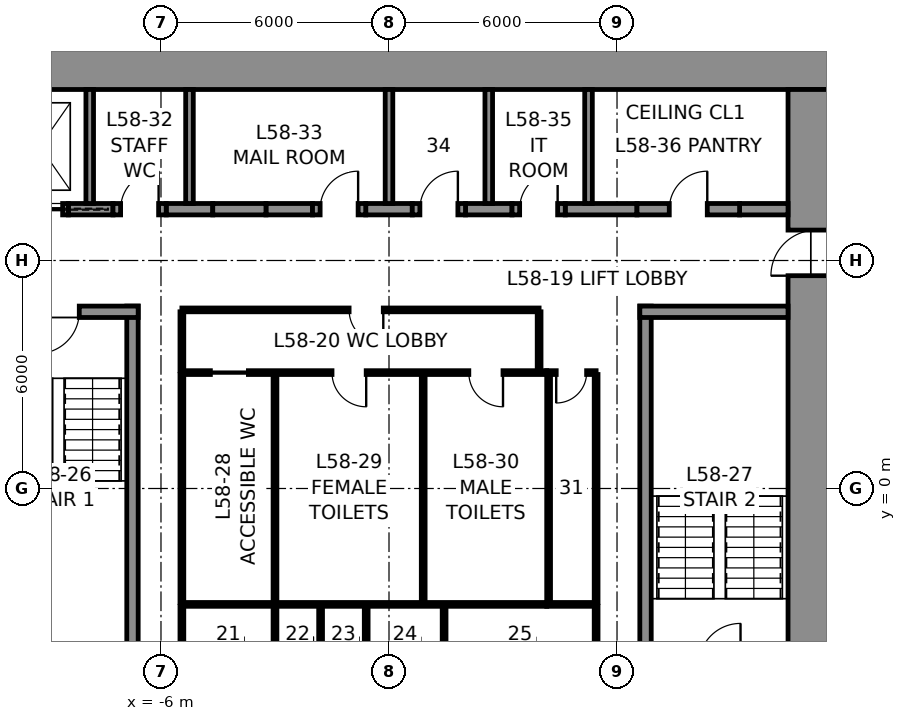
"""IFC4 building model, lengths in metres.
Left out: names, types, materials, properties, quantities, classifications, styles, units other than length and angle.
Written with IfcOpenShell. Run it as: python <this file> out.ifc"""

import sys

from ifc_helpers import new_model, si_unit, direction, frame, frame_2d, origin, place, context, subcontext, project, spatial, rectangle, extrude, element, fill, save


model = new_model("IFC4")
c1 = context("Model", 3, precision=1e-05, world=origin(), true_north=direction((0.0, 1.0)))
c2 = subcontext(c1, "Body", "Model", "MODEL_VIEW")
j1 = project(units=[si_unit("LENGTHUNIT", "METRE"), si_unit("PLANEANGLEUNIT", "RADIAN")], contexts=[c1])
p1 = place(None, origin())
s1 = spatial("IfcSite", under=j1, at=p1, CompositionType="ELEMENT")
p2 = place(p1, origin())
s2 = spatial("IfcBuilding", under=s1, at=p2, CompositionType="ELEMENT")
p3 = place(p2, frame((0.0, 0.0, 261.8)))
s3 = spatial("IfcBuildingStorey", under=s2, at=p3, CompositionType="ELEMENT", Elevation=261.8)
p4 = place(p3, frame((-12.0, 11.25, 0.0), z_axis=(0.0, 0.0, 1.0), x_axis=(1.0, 0.0, 0.0)))
e1 = element("IfcWall", 1, at=p4, inside=s3, PredefinedType="SHEAR", context=c2, shape_type="SweptSolid", body=[
    extrude(rectangle(XDim=24.0, YDim=1.5, at=frame_2d((12.0, 0.0))), origin(), (0.0, 0.0, 1.0), 4.0),
])
p5 = place(p3, frame((11.25, 10.5, 0.0), z_axis=(0.0, 0.0, 1.0), x_axis=(0.0, -1.0, 0.0)))
e2 = element("IfcWall", 2, at=p5, inside=s3, PredefinedType="SHEAR", context=c2, shape_type="SweptSolid", body=[
    extrude(rectangle(XDim=21.0, YDim=1.5, at=frame_2d((10.5, 0.0))), origin(), (0.0, 0.0, 1.0), 4.0),
])
p6 = place(p5, frame((3.7, 0.0, 0.0)))
e3 = element("IfcOpeningElement", 3, at=p6, cuts=e2, PredefinedType="OPENING", context=c2, shape_type="SweptSolid", body=[
    extrude(rectangle(XDim=1.2, YDim=2.3, at=frame_2d((0.6, 1.15))), frame((0.0, 0.76, 0.0), z_axis=(0.0, -1.0, 0.0), x_axis=(1.0, 0.0, 0.0)), (0.0, 0.0, 1.0), 1.52),
])
p7 = place(p5, frame((16.1, 0.0, 0.0)))
e4 = element("IfcOpeningElement", 4, at=p7, cuts=e2, PredefinedType="OPENING", context=c2, shape_type="SweptSolid", body=[
    extrude(rectangle(XDim=1.2, YDim=2.3, at=frame_2d((0.6, 1.15))), frame((0.0, 0.76, 0.0), z_axis=(0.0, -1.0, 0.0), x_axis=(1.0, 0.0, 0.0)), (0.0, 0.0, 1.0), 1.52),
])
p8 = place(p3, frame((-8.438, 7.35, 0.0), z_axis=(0.0, 0.0, 1.0), x_axis=(1.0, 0.0, 0.0)))
e5 = element("IfcWall", 5, at=p8, inside=s3, PredefinedType="SHEAR", context=c2, shape_type="SweptSolid", body=[
    extrude(rectangle(XDim=1.175, YDim=0.3, at=frame_2d((0.587, 0.0))), origin(), (0.0, 0.0, 1.0), 4.0),
])
for number, where, z_axis, x_axis in (
    (6, (-5.863, 7.35, 0.0), (0.0, 0.0, 1.0), (1.0, 0.0, 0.0)),
    (7, (-3.238, 7.35, 0.0), (0.0, 0.0, 1.0), (1.0, 0.0, 0.0)),
    (8, (-0.613, 7.35, 0.0), (0.0, 0.0, 1.0), (1.0, 0.0, 0.0)),
    (9, (2.012, 7.35, 0.0), (0.0, 0.0, 1.0), (1.0, 0.0, 0.0)),
):
    element("IfcWall", number, at=place(p3, frame(where, z_axis=z_axis, x_axis=x_axis)), inside=s3, PredefinedType="SHEAR", context=c2, shape_type="SweptSolid", body=[
        extrude(rectangle(XDim=1.225, YDim=0.3, at=frame_2d((0.613, 0.0))), origin(), (0.0, 0.0, 1.0), 4.0),
    ])
p9 = place(p3, frame((4.637, 7.35, 0.0), z_axis=(0.0, 0.0, 1.0), x_axis=(1.0, 0.0, 0.0)))
e10 = element("IfcWall", 10, at=p9, inside=s3, PredefinedType="SHEAR", context=c2, shape_type="SweptSolid", body=[
    extrude(rectangle(XDim=1.887, YDim=0.3, at=frame_2d((0.944, 0.0))), origin(), (0.0, 0.0, 1.0), 4.0),
])
p10 = place(p3, frame((9.225, 7.35, 0.0), z_axis=(0.0, 0.0, 1.0), x_axis=(1.0, 0.0, 0.0)))
e11 = element("IfcWall", 11, at=p10, inside=s3, PredefinedType="SHEAR", context=c2, shape_type="SweptSolid", body=[
    extrude(rectangle(XDim=1.275, YDim=0.3, at=frame_2d((0.637, 0.0))), origin(), (0.0, 0.0, 1.0), 4.0),
])
p11 = place(p3, frame((-9.938, 7.35, 0.0), z_axis=(0.0, 0.0, 1.0), x_axis=(1.0, 0.0, 0.0)))
e12 = element("IfcWall", 12, at=p11, inside=s3, PredefinedType="PARTITIONING", context=c2, shape_type="SweptSolid", body=[
    extrude(rectangle(XDim=1.5, YDim=0.3, at=frame_2d((0.75, 0.0))), origin(), (0.0, 0.0, 1.0), 4.0),
])
p12 = place(p11, frame((0.15, 0.0, 0.0)))
e13 = element("IfcOpeningElement", 13, at=p12, cuts=e12, PredefinedType="OPENING", context=c2, shape_type="SweptSolid", body=[
    extrude(rectangle(XDim=1.2, YDim=2.3, at=frame_2d((0.6, 1.15))), frame((0.0, 0.16, 0.0), z_axis=(0.0, -1.0, 0.0), x_axis=(1.0, 0.0, 0.0)), (0.0, 0.0, 1.0), 0.32),
])
p13 = place(p3, frame((-7.262, 7.35, 0.0), z_axis=(0.0, 0.0, 1.0), x_axis=(1.0, 0.0, 0.0)))
e14 = element("IfcWall", 14, at=p13, inside=s3, PredefinedType="PARTITIONING", context=c2, shape_type="SweptSolid", body=[
    extrude(rectangle(XDim=1.4, YDim=0.3, at=frame_2d((0.7, 0.0))), origin(), (0.0, 0.0, 1.0), 4.0),
])
p14 = place(p13, frame((0.2, 0.0, 0.0)))
e15 = element("IfcOpeningElement", 15, at=p14, cuts=e14, PredefinedType="OPENING", context=c2, shape_type="SweptSolid", body=[
    extrude(rectangle(XDim=1.0, YDim=2.3, at=frame_2d((0.5, 1.15))), frame((0.0, 0.16, 0.0), z_axis=(0.0, -1.0, 0.0), x_axis=(1.0, 0.0, 0.0)), (0.0, 0.0, 1.0), 0.32),
])
p15 = place(p3, frame((-4.637, 7.35, 0.0), z_axis=(0.0, 0.0, 1.0), x_axis=(1.0, 0.0, 0.0)))
e16 = element("IfcWall", 16, at=p15, inside=s3, PredefinedType="PARTITIONING", context=c2, shape_type="SweptSolid", body=[
    extrude(rectangle(XDim=1.4, YDim=0.3, at=frame_2d((0.7, 0.0))), origin(), (0.0, 0.0, 1.0), 4.0),
])
p16 = place(p3, frame((-2.012, 7.35, 0.0), z_axis=(0.0, 0.0, 1.0), x_axis=(1.0, 0.0, 0.0)))
e17 = element("IfcWall", 17, at=p16, inside=s3, PredefinedType="PARTITIONING", context=c2, shape_type="SweptSolid", body=[
    extrude(rectangle(XDim=1.4, YDim=0.3, at=frame_2d((0.7, 0.0))), origin(), (0.0, 0.0, 1.0), 4.0),
])
p17 = place(p16, frame((0.2, 0.0, 0.0)))
e18 = element("IfcOpeningElement", 18, at=p17, cuts=e17, PredefinedType="OPENING", context=c2, shape_type="SweptSolid", body=[
    extrude(rectangle(XDim=1.0, YDim=2.3, at=frame_2d((0.5, 1.15))), frame((0.0, 0.16, 0.0), z_axis=(0.0, -1.0, 0.0), x_axis=(1.0, 0.0, 0.0)), (0.0, 0.0, 1.0), 0.32),
])
p18 = place(p3, frame((0.613, 7.35, 0.0), z_axis=(0.0, 0.0, 1.0), x_axis=(1.0, 0.0, 0.0)))
e19 = element("IfcWall", 19, at=p18, inside=s3, PredefinedType="PARTITIONING", context=c2, shape_type="SweptSolid", body=[
    extrude(rectangle(XDim=1.4, YDim=0.3, at=frame_2d((0.7, 0.0))), origin(), (0.0, 0.0, 1.0), 4.0),
])
p19 = place(p18, frame((0.2, 0.0, 0.0)))
e20 = element("IfcOpeningElement", 20, at=p19, cuts=e19, PredefinedType="OPENING", context=c2, shape_type="SweptSolid", body=[
    extrude(rectangle(XDim=1.0, YDim=2.3, at=frame_2d((0.5, 1.15))), frame((0.0, 0.16, 0.0), z_axis=(0.0, -1.0, 0.0), x_axis=(1.0, 0.0, 0.0)), (0.0, 0.0, 1.0), 0.32),
])
p20 = place(p3, frame((3.238, 7.35, 0.0), z_axis=(0.0, 0.0, 1.0), x_axis=(1.0, 0.0, 0.0)))
e21 = element("IfcWall", 21, at=p20, inside=s3, PredefinedType="PARTITIONING", context=c2, shape_type="SweptSolid", body=[
    extrude(rectangle(XDim=1.4, YDim=0.3, at=frame_2d((0.7, 0.0))), origin(), (0.0, 0.0, 1.0), 4.0),
])
p21 = place(p20, frame((0.2, 0.0, 0.0)))
e22 = element("IfcOpeningElement", 22, at=p21, cuts=e21, PredefinedType="OPENING", context=c2, shape_type="SweptSolid", body=[
    extrude(rectangle(XDim=1.0, YDim=2.3, at=frame_2d((0.5, 1.15))), frame((0.0, 0.16, 0.0), z_axis=(0.0, -1.0, 0.0), x_axis=(1.0, 0.0, 0.0)), (0.0, 0.0, 1.0), 0.32),
])
p22 = place(p3, frame((6.525, 7.35, 0.0), z_axis=(0.0, 0.0, 1.0), x_axis=(1.0, 0.0, 0.0)))
e23 = element("IfcWall", 23, at=p22, inside=s3, PredefinedType="PARTITIONING", context=c2, shape_type="SweptSolid", body=[
    extrude(rectangle(XDim=2.7, YDim=0.3, at=frame_2d((1.35, 0.0))), origin(), (0.0, 0.0, 1.0), 4.0),
])
p23 = place(p22, frame((0.85, 0.0, 0.0)))
e24 = element("IfcOpeningElement", 24, at=p23, cuts=e23, PredefinedType="OPENING", context=c2, shape_type="SweptSolid", body=[
    extrude(rectangle(XDim=1.0, YDim=2.3, at=frame_2d((0.5, 1.15))), frame((0.0, 0.16, 0.0), z_axis=(0.0, -1.0, 0.0), x_axis=(1.0, 0.0, 0.0)), (0.0, 0.0, 1.0), 0.32),
])
for number, where, z_axis, x_axis in (
    (25, (-7.875, 7.5, 0.0), (0.0, 0.0, 1.0), (0.0, 1.0, 0.0)),
    (26, (-5.25, 7.5, 0.0), (0.0, 0.0, 1.0), (0.0, 1.0, 0.0)),
    (27, (0.0, 7.5, 0.0), (0.0, 0.0, 1.0), (0.0, 1.0, 0.0)),
    (28, (2.625, 7.5, 0.0), (0.0, 0.0, 1.0), (0.0, 1.0, 0.0)),
    (29, (5.25, 7.5, 0.0), (0.0, 0.0, 1.0), (0.0, 1.0, 0.0)),
):
    element("IfcWall", number, at=place(p3, frame(where, z_axis=z_axis, x_axis=x_axis)), inside=s3, PredefinedType="PARTITIONING", context=c2, shape_type="SweptSolid", body=[
        extrude(rectangle(XDim=3.0, YDim=0.2, at=frame_2d((1.5, 0.0))), origin(), (0.0, 0.0, 1.0), 4.0),
    ])
p24 = place(p3, frame((-6.75, -4.8, 0.0), z_axis=(0.0, 0.0, 1.0), x_axis=(0.0, 1.0, 0.0)))
e30 = element("IfcWall", 30, at=p24, inside=s3, PredefinedType="SOLIDWALL", context=c2, shape_type="SweptSolid", body=[
    extrude(rectangle(XDim=9.6, YDim=0.3, at=frame_2d((4.8, 0.0))), origin(), (0.0, 0.0, 1.0), 3.75),
])
p25 = place(p3, frame((-10.5, 4.65, 0.0), z_axis=(0.0, 0.0, 1.0), x_axis=(1.0, 0.0, 0.0)))
e31 = element("IfcWall", 31, at=p25, inside=s3, PredefinedType="SOLIDWALL", context=c2, shape_type="SweptSolid", body=[
    extrude(rectangle(XDim=3.9, YDim=0.3, at=frame_2d((1.95, 0.0))), origin(), (0.0, 0.0, 1.0), 3.75),
])
p26 = place(p25, frame((1.25, 0.0, 0.0)))
e32 = element("IfcOpeningElement", 32, at=p26, cuts=e31, PredefinedType="OPENING", context=c2, shape_type="SweptSolid", body=[
    extrude(rectangle(XDim=1.1, YDim=2.3, at=frame_2d((0.55, 1.15))), frame((0.0, 0.16, 0.0), z_axis=(0.0, -1.0, 0.0), x_axis=(1.0, 0.0, 0.0)), (0.0, 0.0, 1.0), 0.32),
])
p27 = place(p3, frame((6.75, -4.8, 0.0), z_axis=(0.0, 0.0, 1.0), x_axis=(0.0, 1.0, 0.0)))
e33 = element("IfcWall", 33, at=p27, inside=s3, PredefinedType="SOLIDWALL", context=c2, shape_type="SweptSolid", body=[
    extrude(rectangle(XDim=9.6, YDim=0.3, at=frame_2d((4.8, 0.0))), origin(), (0.0, 0.0, 1.0), 3.75),
])
p28 = place(p3, frame((6.6, 4.65, 0.0), z_axis=(0.0, 0.0, 1.0), x_axis=(1.0, 0.0, 0.0)))
e34 = element("IfcWall", 34, at=p28, inside=s3, PredefinedType="SOLIDWALL", context=c2, shape_type="SweptSolid", body=[
    extrude(rectangle(XDim=3.9, YDim=0.3, at=frame_2d((1.95, 0.0))), origin(), (0.0, 0.0, 1.0), 3.75),
])
p29 = place(p3, frame((-5.45, 3.05, 0.0), z_axis=(0.0, 0.0, 1.0), x_axis=(1.0, 0.0, 0.0)))
e35 = element("IfcWall", 35, at=p29, inside=s3, PredefinedType="PARTITIONING", context=c2, shape_type="SweptSolid", body=[
    extrude(rectangle(XDim=9.6, YDim=0.1, at=frame_2d((4.8, 0.0))), origin(), (0.0, 0.0, 1.0), 3.75),
])
p30 = place(p29, frame((0.75, 0.0, 0.0)))
e36 = element("IfcOpeningElement", 36, at=p30, cuts=e35, PredefinedType="OPENING", context=c2, shape_type="SweptSolid", body=[
    extrude(rectangle(XDim=1.0, YDim=2.3, at=frame_2d((0.5, 1.15))), frame((0.0, 0.06, 0.0), z_axis=(0.0, -1.0, 0.0), x_axis=(1.0, 0.0, 0.0)), (0.0, 0.0, 1.0), 0.12),
])
p31 = place(p29, frame((3.95, 0.0, 0.0)))
e37 = element("IfcOpeningElement", 37, at=p31, cuts=e35, PredefinedType="OPENING", context=c2, shape_type="SweptSolid", body=[
    extrude(rectangle(XDim=0.9, YDim=2.3, at=frame_2d((0.45, 1.15))), frame((0.0, 0.06, 0.0), z_axis=(0.0, -1.0, 0.0), x_axis=(1.0, 0.0, 0.0)), (0.0, 0.0, 1.0), 0.12),
])
p32 = place(p29, frame((7.55, 0.0, 0.0)))
e38 = element("IfcOpeningElement", 38, at=p32, cuts=e35, PredefinedType="OPENING", context=c2, shape_type="SweptSolid", body=[
    extrude(rectangle(XDim=0.9, YDim=2.3, at=frame_2d((0.45, 1.15))), frame((0.0, 0.06, 0.0), z_axis=(0.0, -1.0, 0.0), x_axis=(1.0, 0.0, 0.0)), (0.0, 0.0, 1.0), 0.12),
])
p33 = place(p3, frame((4.15, 3.05, 0.0), z_axis=(0.0, 0.0, 1.0), x_axis=(1.0, 0.0, 0.0)))
e39 = element("IfcWall", 39, at=p33, inside=s3, PredefinedType="PARTITIONING", context=c2, shape_type="SweptSolid", body=[
    extrude(rectangle(XDim=1.3, YDim=0.1, at=frame_2d((0.65, 0.0))), origin(), (0.0, 0.0, 1.0), 3.75),
])
p34 = place(p33, frame((0.25, 0.0, 0.0)))
e40 = element("IfcOpeningElement", 40, at=p34, cuts=e39, PredefinedType="OPENING", context=c2, shape_type="SweptSolid", body=[
    extrude(rectangle(XDim=0.8, YDim=2.3, at=frame_2d((0.4, 1.15))), frame((0.0, 0.06, 0.0), z_axis=(0.0, -1.0, 0.0), x_axis=(1.0, 0.0, 0.0)), (0.0, 0.0, 1.0), 0.12),
])
p35 = place(p3, frame((4.15, -3.05, 0.0), z_axis=(0.0, 0.0, 1.0), x_axis=(-1.0, 0.0, 0.0)))
e41 = element("IfcWall", 41, at=p35, inside=s3, PredefinedType="PARTITIONING", context=c2, shape_type="SweptSolid", body=[
    extrude(rectangle(XDim=9.6, YDim=0.1, at=frame_2d((4.8, 0.0))), origin(), (0.0, 0.0, 1.0), 3.75),
])
p36 = place(p3, frame((5.45, -3.05, 0.0), z_axis=(0.0, 0.0, 1.0), x_axis=(-1.0, 0.0, 0.0)))
e42 = element("IfcWall", 42, at=p36, inside=s3, PredefinedType="PARTITIONING", context=c2, shape_type="SweptSolid", body=[
    extrude(rectangle(XDim=1.3, YDim=0.1, at=frame_2d((0.65, 0.0))), origin(), (0.0, 0.0, 1.0), 3.75),
])
for number, where, z_axis, x_axis in (
    (43, (5.45, 3.0, 0.0), (0.0, 0.0, 1.0), (0.0, -1.0, 0.0)),
    (44, (-5.45, -3.0, 0.0), (0.0, 0.0, 1.0), (0.0, 1.0, 0.0)),
    (45, (-3.0, -3.0, 0.0), (0.0, 0.0, 1.0), (0.0, 1.0, 0.0)),
    (46, (0.9, -3.0, 0.0), (0.0, 0.0, 1.0), (0.0, 1.0, 0.0)),
    (47, (4.2, -3.0, 0.0), (0.0, 0.0, 1.0), (0.0, 1.0, 0.0)),
):
    element("IfcWall", number, at=place(p3, frame(where, z_axis=z_axis, x_axis=x_axis)), inside=s3, PredefinedType="PARTITIONING", context=c2, shape_type="SweptSolid", body=[
        extrude(rectangle(XDim=6.0, YDim=0.1, at=frame_2d((3.0, 0.0))), origin(), (0.0, 0.0, 1.0), 3.75),
    ])
p37 = place(p3, frame((-5.45, 4.7, 0.0), z_axis=(0.0, 0.0, 1.0), x_axis=(1.0, 0.0, 0.0)))
e48 = element("IfcWall", 48, at=p37, inside=s3, PredefinedType="PARTITIONING", context=c2, shape_type="SweptSolid", body=[
    extrude(rectangle(XDim=9.4, YDim=0.1, at=frame_2d((4.7, 0.0))), origin(), (0.0, 0.0, 1.0), 3.75),
])
p38 = place(p37, frame((4.4, 0.0, 0.0)))
e49 = element("IfcOpeningElement", 49, at=p38, cuts=e48, PredefinedType="OPENING", context=c2, shape_type="SweptSolid", body=[
    extrude(rectangle(XDim=0.9, YDim=2.3, at=frame_2d((0.45, 1.15))), frame((0.0, 0.06, 0.0), z_axis=(0.0, -1.0, 0.0), x_axis=(1.0, 0.0, 0.0)), (0.0, 0.0, 1.0), 0.12),
])
for number, where, z_axis, x_axis in (
    (50, (-5.45, 3.1, 0.0), (0.0, 0.0, 1.0), (0.0, 1.0, 0.0)),
    (51, (3.95, 3.1, 0.0), (0.0, 0.0, 1.0), (0.0, 1.0, 0.0)),
    (52, (-5.45, -3.1, 0.0), (0.0, 0.0, 1.0), (0.0, -1.0, 0.0)),
    (53, (5.45, -3.1, 0.0), (0.0, 0.0, 1.0), (0.0, -1.0, 0.0)),
    (54, (-3.0, -3.1, 0.0), (0.0, 0.0, 1.0), (0.0, -1.0, 0.0)),
    (55, (-1.8, -3.1, 0.0), (0.0, 0.0, 1.0), (0.0, -1.0, 0.0)),
    (56, (-0.6, -3.1, 0.0), (0.0, 0.0, 1.0), (0.0, -1.0, 0.0)),
    (57, (1.45, -3.1, 0.0), (0.0, 0.0, 1.0), (0.0, -1.0, 0.0)),
):
    element("IfcWall", number, at=place(p3, frame(where, z_axis=z_axis, x_axis=x_axis)), inside=s3, PredefinedType="PARTITIONING", context=c2, shape_type="SweptSolid", body=[
        extrude(rectangle(XDim=1.55, YDim=0.1, at=frame_2d((0.775, 0.0))), origin(), (0.0, 0.0, 1.0), 3.75),
    ])
p39 = place(p26, frame((1.1, 0.0, 0.0), z_axis=(0.0, 0.0, 1.0), x_axis=(-1.0, 0.0, 0.0)))
e58 = element("IfcDoor", 58, at=p39, inside=s3, OperationType="SINGLE_SWING_RIGHT", PredefinedType="DOOR", context=c2, shape_type="SweptSolid", body=[
    extrude(rectangle(XDim=1.1, YDim=2.3, at=frame_2d((0.55, 1.15))), frame((0.0, 0.025, 0.0), z_axis=(0.0, -1.0, 0.0), x_axis=(1.0, 0.0, 0.0)), (0.0, 0.0, 1.0), 0.05),
])
fill(e32, e58)
p40 = place(p30, frame((1.0, 0.0, 0.0), z_axis=(0.0, 0.0, 1.0), x_axis=(-1.0, 0.0, 0.0)))
e59 = element("IfcDoor", 59, at=p40, inside=s3, OperationType="SLIDING_TO_LEFT", PredefinedType="DOOR", context=c2, shape_type="SweptSolid", body=[
    extrude(rectangle(XDim=1.0, YDim=2.3, at=frame_2d((0.5, 1.15))), frame((0.0, 0.025, 0.0), z_axis=(0.0, -1.0, 0.0), x_axis=(1.0, 0.0, 0.0)), (0.0, 0.0, 1.0), 0.05),
])
fill(e36, e59)
p41 = place(p31, frame((0.9, 0.0, 0.0), z_axis=(0.0, 0.0, 1.0), x_axis=(-1.0, 0.0, 0.0)))
e60 = element("IfcDoor", 60, at=p41, inside=s3, OperationType="SINGLE_SWING_LEFT", PredefinedType="DOOR", context=c2, shape_type="SweptSolid", body=[
    extrude(rectangle(XDim=0.9, YDim=2.3, at=frame_2d((0.45, 1.15))), frame((0.0, 0.025, 0.0), z_axis=(0.0, -1.0, 0.0), x_axis=(1.0, 0.0, 0.0)), (0.0, 0.0, 1.0), 0.05),
])
fill(e37, e60)
p42 = place(p32, frame((0.9, 0.0, 0.0), z_axis=(0.0, 0.0, 1.0), x_axis=(-1.0, 0.0, 0.0)))
e61 = element("IfcDoor", 61, at=p42, inside=s3, OperationType="SINGLE_SWING_LEFT", PredefinedType="DOOR", context=c2, shape_type="SweptSolid", body=[
    extrude(rectangle(XDim=0.9, YDim=2.3, at=frame_2d((0.45, 1.15))), frame((0.0, 0.025, 0.0), z_axis=(0.0, -1.0, 0.0), x_axis=(1.0, 0.0, 0.0)), (0.0, 0.0, 1.0), 0.05),
])
fill(e38, e61)
p43 = place(p34, frame((0.8, 0.0, 0.0), z_axis=(0.0, 0.0, 1.0), x_axis=(-1.0, 0.0, 0.0)))
e62 = element("IfcDoor", 62, at=p43, inside=s3, OperationType="SINGLE_SWING_RIGHT", PredefinedType="DOOR", context=c2, shape_type="SweptSolid", body=[
    extrude(rectangle(XDim=0.8, YDim=2.3, at=frame_2d((0.4, 1.15))), frame((0.0, 0.025, 0.0), z_axis=(0.0, -1.0, 0.0), x_axis=(1.0, 0.0, 0.0)), (0.0, 0.0, 1.0), 0.05),
])
fill(e40, e62)
p44 = place(p38, frame((0.9, 0.0, 0.0), z_axis=(0.0, 0.0, 1.0), x_axis=(-1.0, 0.0, 0.0)))
e63 = element("IfcDoor", 63, at=p44, inside=s3, OperationType="SINGLE_SWING_LEFT", PredefinedType="DOOR", context=c2, shape_type="SweptSolid", body=[
    extrude(rectangle(XDim=0.9, YDim=2.3, at=frame_2d((0.45, 1.15))), frame((0.0, 0.025, 0.0), z_axis=(0.0, -1.0, 0.0), x_axis=(1.0, 0.0, 0.0)), (0.0, 0.0, 1.0), 0.05),
])
fill(e49, e63)
p45 = place(p14, origin())
e64 = element("IfcDoor", 64, at=p45, inside=s3, OperationType="SINGLE_SWING_RIGHT", PredefinedType="DOOR", context=c2, shape_type="SweptSolid", body=[
    extrude(rectangle(XDim=1.0, YDim=2.3, at=frame_2d((0.5, 1.15))), frame((0.0, 0.025, 0.0), z_axis=(0.0, -1.0, 0.0), x_axis=(1.0, 0.0, 0.0)), (0.0, 0.0, 1.0), 0.05),
])
fill(e15, e64)
p46 = place(p17, origin())
e65 = element("IfcDoor", 65, at=p46, inside=s3, OperationType="SINGLE_SWING_RIGHT", PredefinedType="DOOR", context=c2, shape_type="SweptSolid", body=[
    extrude(rectangle(XDim=1.0, YDim=2.3, at=frame_2d((0.5, 1.15))), frame((0.0, 0.025, 0.0), z_axis=(0.0, -1.0, 0.0), x_axis=(1.0, 0.0, 0.0)), (0.0, 0.0, 1.0), 0.05),
])
fill(e18, e65)
p47 = place(p19, origin())
e66 = element("IfcDoor", 66, at=p47, inside=s3, OperationType="SINGLE_SWING_RIGHT", PredefinedType="DOOR", context=c2, shape_type="SweptSolid", body=[
    extrude(rectangle(XDim=1.0, YDim=2.3, at=frame_2d((0.5, 1.15))), frame((0.0, 0.025, 0.0), z_axis=(0.0, -1.0, 0.0), x_axis=(1.0, 0.0, 0.0)), (0.0, 0.0, 1.0), 0.05),
])
fill(e20, e66)
p48 = place(p21, origin())
e67 = element("IfcDoor", 67, at=p48, inside=s3, OperationType="SINGLE_SWING_RIGHT", PredefinedType="DOOR", context=c2, shape_type="SweptSolid", body=[
    extrude(rectangle(XDim=1.0, YDim=2.3, at=frame_2d((0.5, 1.15))), frame((0.0, 0.025, 0.0), z_axis=(0.0, -1.0, 0.0), x_axis=(1.0, 0.0, 0.0)), (0.0, 0.0, 1.0), 0.05),
])
fill(e22, e67)
p49 = place(p23, origin())
e68 = element("IfcDoor", 68, at=p49, inside=s3, OperationType="SINGLE_SWING_RIGHT", PredefinedType="DOOR", context=c2, shape_type="SweptSolid", body=[
    extrude(rectangle(XDim=1.0, YDim=2.3, at=frame_2d((0.5, 1.15))), frame((0.0, 0.025, 0.0), z_axis=(0.0, -1.0, 0.0), x_axis=(1.0, 0.0, 0.0)), (0.0, 0.0, 1.0), 0.05),
])
fill(e24, e68)
p50 = place(p6, frame((1.2, 0.0, 0.0), z_axis=(0.0, 0.0, 1.0), x_axis=(-1.0, 0.0, 0.0)))
e69 = element("IfcDoor", 69, at=p50, inside=s3, OperationType="SINGLE_SWING_LEFT", PredefinedType="DOOR", context=c2, shape_type="SweptSolid", body=[
    extrude(rectangle(XDim=1.2, YDim=2.3, at=frame_2d((0.6, 1.15))), frame((0.0, 0.025, 0.0), z_axis=(0.0, -1.0, 0.0), x_axis=(1.0, 0.0, 0.0)), (0.0, 0.0, 1.0), 0.05),
])
fill(e3, e69)
p51 = place(p12, frame((1.2, 0.0, 0.0), z_axis=(0.0, 0.0, 1.0), x_axis=(-1.0, 0.0, 0.0)))
e70 = element("IfcDoor", 70, at=p51, inside=s3, OperationType="SLIDING_TO_LEFT", PredefinedType="DOOR", context=c2, shape_type="SweptSolid", body=[
    extrude(rectangle(XDim=1.2, YDim=2.3, at=frame_2d((0.6, 1.15))), frame((0.0, 0.025, 0.0), z_axis=(0.0, -1.0, 0.0), x_axis=(1.0, 0.0, 0.0)), (0.0, 0.0, 1.0), 0.05),
])
fill(e13, e70)
save(model, sys.argv[1])
